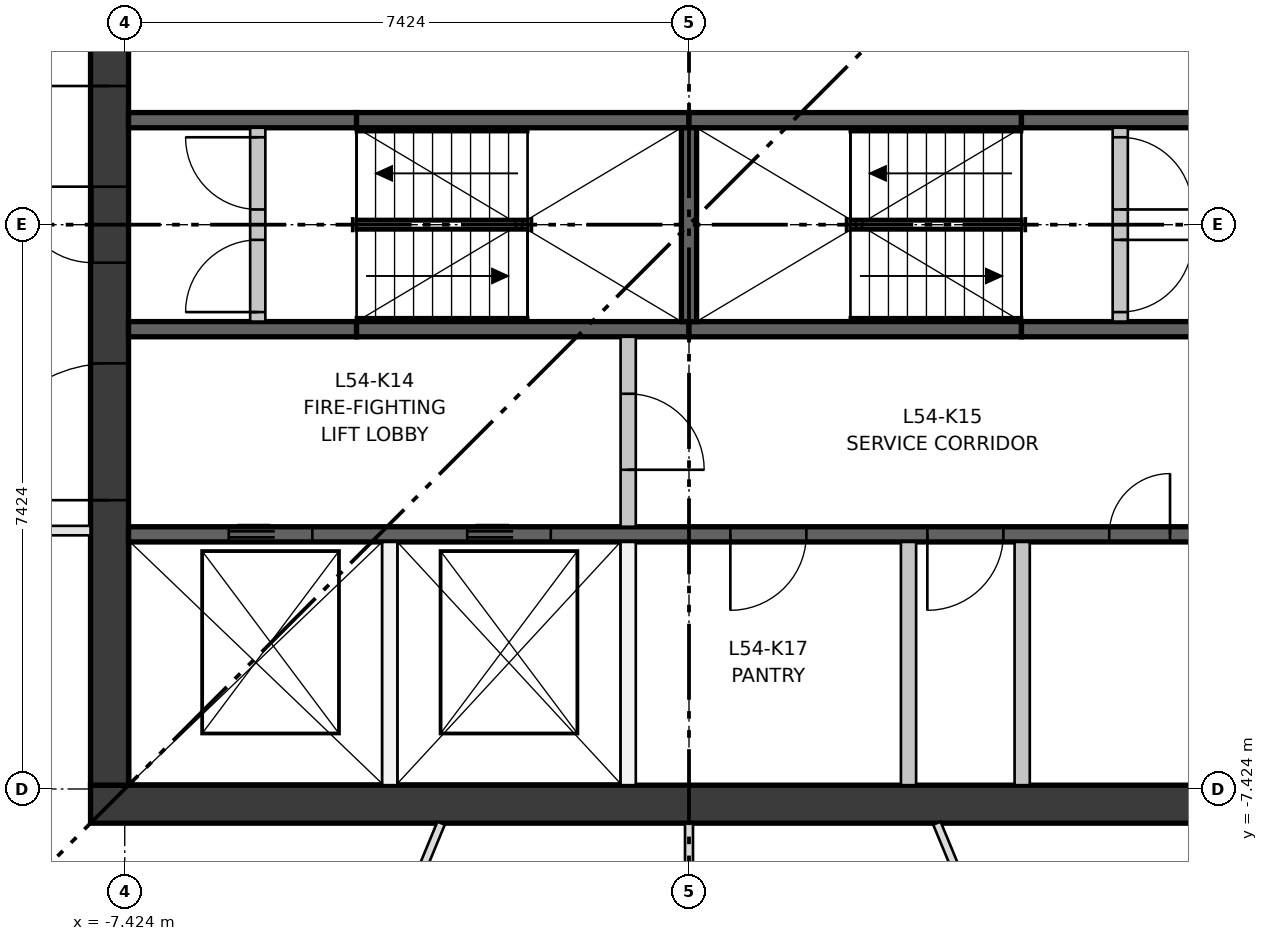
"""IFC4 building model, lengths in metres.
Left out: names, types, materials, properties, quantities, classifications, styles, units other than length and angle.
Written with IfcOpenShell. Run it as: python <this file> out.ifc"""

import sys

from ifc_helpers import new_model, si_unit, direction, frame, frame_2d, origin, place, context, subcontext, project, spatial, rectangle, extrude, element, fill, save


model = new_model("IFC4")
c1 = context("Model", 3, precision=1e-05, world=origin(), true_north=direction((0.0, 1.0)))
c2 = subcontext(c1, "Body", "Model", "MODEL_VIEW")
j1 = project(units=[si_unit("LENGTHUNIT", "METRE"), si_unit("PLANEANGLEUNIT", "RADIAN")], contexts=[c1])
p1 = place(None, origin())
s1 = spatial("IfcSite", under=j1, at=p1, CompositionType="ELEMENT")
p2 = place(p1, origin())
s2 = spatial("IfcBuilding", under=s1, at=p2, CompositionType="ELEMENT")
p3 = place(p2, frame((0.0, 0.0, 201.05)))
s3 = spatial("IfcBuildingStorey", under=s2, at=p3, CompositionType="ELEMENT", Elevation=201.05)
p4 = place(p3, frame((-7.874, -7.624, 0.0), z_axis=(0.0, 0.0, 1.0), x_axis=(1.0, 0.0, 0.0)))
e1 = element("IfcWall", 1, at=p4, inside=s3, PredefinedType="SHEAR", context=c2, shape_type="SweptSolid", body=[
    extrude(rectangle(XDim=15.748, YDim=0.5, at=frame_2d((7.874, 0.0))), origin(), (0.0, 0.0, 1.0), 3.35),
])
p5 = place(p3, frame((-7.624, -7.374, 0.0), z_axis=(0.0, 0.0, 1.0), x_axis=(0.0, 1.0, 0.0)))
e2 = element("IfcWall", 2, at=p5, inside=s3, PredefinedType="SHEAR", context=c2, shape_type="SweptSolid", body=[
    extrude(rectangle(XDim=14.748, YDim=0.5, at=frame_2d((7.374, 0.0))), origin(), (0.0, 0.0, 1.0), 3.35),
])
p6 = place(p5, frame((6.874, 0.0, 0.0)))
e3 = element("IfcOpeningElement", 3, at=p6, cuts=e2, PredefinedType="OPENING", context=c2, shape_type="SweptSolid", body=[
    extrude(rectangle(XDim=1.0, YDim=2.1, at=frame_2d((0.5, 1.05))), frame((0.0, 0.26, 0.0), z_axis=(0.0, -1.0, 0.0), x_axis=(1.0, 0.0, 0.0)), (0.0, 0.0, 1.0), 0.52),
])
p7 = place(p5, frame((3.75, 0.0, 0.0)))
e4 = element("IfcOpeningElement", 4, at=p7, cuts=e2, PredefinedType="OPENING", context=c2, shape_type="SweptSolid", body=[
    extrude(rectangle(XDim=1.8, YDim=2.1, at=frame_2d((0.9, 1.05))), frame((0.0, 0.26, 0.0), z_axis=(0.0, -1.0, 0.0), x_axis=(1.0, 0.0, 0.0)), (0.0, 0.0, 1.0), 0.52),
])
p8 = place(p5, frame((9.198, 0.0, 0.0)))
e5 = element("IfcOpeningElement", 5, at=p8, cuts=e2, PredefinedType="OPENING", context=c2, shape_type="SweptSolid", body=[
    extrude(rectangle(XDim=1.8, YDim=2.1, at=frame_2d((0.9, 1.05))), frame((0.0, 0.26, 0.0), z_axis=(0.0, -1.0, 0.0), x_axis=(1.0, 0.0, 0.0)), (0.0, 0.0, 1.0), 0.52),
])
p9 = place(p3, frame((-7.374, -4.074, 0.0), z_axis=(0.0, 0.0, 1.0), x_axis=(1.0, 0.0, 0.0)))
e6 = element("IfcWall", 6, at=p9, inside=s3, PredefinedType="SHEAR", context=c2, shape_type="SweptSolid", body=[
    extrude(rectangle(XDim=14.748, YDim=0.2, at=frame_2d((7.374, 0.0))), origin(), (0.0, 0.0, 1.0), 3.0),
])
p10 = place(p9, frame((1.319, 0.0, 0.0)))
e7 = element("IfcOpeningElement", 7, at=p10, cuts=e6, PredefinedType="OPENING", context=c2, shape_type="SweptSolid", body=[
    extrude(rectangle(XDim=1.1, YDim=2.1, at=frame_2d((0.55, 1.05))), frame((0.0, 0.11, 0.0), z_axis=(0.0, -1.0, 0.0), x_axis=(1.0, 0.0, 0.0)), (0.0, 0.0, 1.0), 0.22),
])
p11 = place(p9, frame((4.456, 0.0, 0.0)))
e8 = element("IfcOpeningElement", 8, at=p11, cuts=e6, PredefinedType="OPENING", context=c2, shape_type="SweptSolid", body=[
    extrude(rectangle(XDim=1.1, YDim=2.1, at=frame_2d((0.55, 1.05))), frame((0.0, 0.11, 0.0), z_axis=(0.0, -1.0, 0.0), x_axis=(1.0, 0.0, 0.0)), (0.0, 0.0, 1.0), 0.22),
])
p12 = place(p9, frame((7.918, 0.0, 0.0)))
e9 = element("IfcOpeningElement", 9, at=p12, cuts=e6, PredefinedType="OPENING", context=c2, shape_type="SweptSolid", body=[
    extrude(rectangle(XDim=1.0, YDim=2.1, at=frame_2d((0.5, 1.05))), frame((0.0, 0.11, 0.0), z_axis=(0.0, -1.0, 0.0), x_axis=(1.0, 0.0, 0.0)), (0.0, 0.0, 1.0), 0.22),
])
p13 = place(p9, frame((10.51, 0.0, 0.0)))
e10 = element("IfcOpeningElement", 10, at=p13, cuts=e6, PredefinedType="OPENING", context=c2, shape_type="SweptSolid", body=[
    extrude(rectangle(XDim=1.0, YDim=2.1, at=frame_2d((0.5, 1.05))), frame((0.0, 0.11, 0.0), z_axis=(0.0, -1.0, 0.0), x_axis=(1.0, 0.0, 0.0)), (0.0, 0.0, 1.0), 0.22),
])
p14 = place(p9, frame((12.903, 0.0, 0.0)))
e11 = element("IfcOpeningElement", 11, at=p14, cuts=e6, PredefinedType="OPENING", context=c2, shape_type="SweptSolid", body=[
    extrude(rectangle(XDim=0.8, YDim=2.1, at=frame_2d((0.4, 1.05))), frame((0.0, 0.11, 0.0), z_axis=(0.0, -1.0, 0.0), x_axis=(1.0, 0.0, 0.0)), (0.0, 0.0, 1.0), 0.22),
])
p15 = place(p3, frame((-7.374, -1.375, 0.0), z_axis=(0.0, 0.0, 1.0), x_axis=(1.0, 0.0, 0.0)))
e12 = element("IfcWall", 12, at=p15, inside=s3, PredefinedType="SHEAR", context=c2, shape_type="SweptSolid", body=[
    extrude(rectangle(XDim=3.0, YDim=0.2, at=frame_2d((1.5, 0.0))), origin(), (0.0, 0.0, 1.0), 3.0),
])
for number, where, z_axis, x_axis in (
    (13, (-4.374, -1.375, 0.0), (0.0, 0.0, 1.0), (1.0, 0.0, 0.0)),
    (14, (0.0, -1.375, 0.0), (0.0, 0.0, 1.0), (1.0, 0.0, 0.0)),
):
    element("IfcWall", number, at=place(p3, frame(where, z_axis=z_axis, x_axis=x_axis)), inside=s3, PredefinedType="SHEAR", context=c2, shape_type="SweptSolid", body=[
        extrude(rectangle(XDim=4.374, YDim=0.2, at=frame_2d((2.187, 0.0))), origin(), (0.0, 0.0, 1.0), 3.0),
    ])
for number, where, z_axis, x_axis in (
    (15, (4.374, -1.375, 0.0), (0.0, 0.0, 1.0), (1.0, 0.0, 0.0)),
    (16, (-7.374, 1.375, 0.0), (0.0, 0.0, 1.0), (1.0, 0.0, 0.0)),
):
    element("IfcWall", number, at=place(p3, frame(where, z_axis=z_axis, x_axis=x_axis)), inside=s3, PredefinedType="SHEAR", context=c2, shape_type="SweptSolid", body=[
        extrude(rectangle(XDim=3.0, YDim=0.2, at=frame_2d((1.5, 0.0))), origin(), (0.0, 0.0, 1.0), 3.0),
    ])
for number, where, z_axis, x_axis in (
    (17, (-4.374, 1.375, 0.0), (0.0, 0.0, 1.0), (1.0, 0.0, 0.0)),
    (18, (0.0, 1.375, 0.0), (0.0, 0.0, 1.0), (1.0, 0.0, 0.0)),
):
    element("IfcWall", number, at=place(p3, frame(where, z_axis=z_axis, x_axis=x_axis)), inside=s3, PredefinedType="SHEAR", context=c2, shape_type="SweptSolid", body=[
        extrude(rectangle(XDim=4.374, YDim=0.2, at=frame_2d((2.187, 0.0))), origin(), (0.0, 0.0, 1.0), 3.0),
    ])
p16 = place(p3, frame((4.374, 1.375, 0.0), z_axis=(0.0, 0.0, 1.0), x_axis=(1.0, 0.0, 0.0)))
e19 = element("IfcWall", 19, at=p16, inside=s3, PredefinedType="SHEAR", context=c2, shape_type="SweptSolid", body=[
    extrude(rectangle(XDim=3.0, YDim=0.2, at=frame_2d((1.5, 0.0))), origin(), (0.0, 0.0, 1.0), 3.0),
])
p17 = place(p3, frame((0.0, -1.275, 0.0), z_axis=(0.0, 0.0, 1.0), x_axis=(0.0, 1.0, 0.0)))
e20 = element("IfcWall", 20, at=p17, inside=s3, PredefinedType="SHEAR", context=c2, shape_type="SweptSolid", body=[
    extrude(rectangle(XDim=2.55, YDim=0.2, at=frame_2d((1.275, 0.0))), origin(), (0.0, 0.0, 1.0), 3.0),
])
for number, where, z_axis, x_axis in (
    (21, (-3.937, -7.374, 0.0), (0.0, 0.0, 1.0), (0.0, 1.0, 0.0)),
    (22, (-0.8, -7.374, 0.0), (0.0, 0.0, 1.0), (0.0, 1.0, 0.0)),
):
    element("IfcWall", number, at=place(p3, frame(where, z_axis=z_axis, x_axis=x_axis)), inside=s3, PredefinedType="PARTITIONING", context=c2, shape_type="SweptSolid", body=[
        extrude(rectangle(XDim=3.2, YDim=0.2, at=frame_2d((1.6, 0.0))), origin(), (0.0, 0.0, 1.0), 3.0),
    ])
p18 = place(p3, frame((-0.8, -3.974, 0.0), z_axis=(0.0, 0.0, 1.0), x_axis=(0.0, 1.0, 0.0)))
e23 = element("IfcWall", 23, at=p18, inside=s3, PredefinedType="PARTITIONING", context=c2, shape_type="SweptSolid", body=[
    extrude(rectangle(XDim=2.499, YDim=0.2, at=frame_2d((1.25, 0.0))), origin(), (0.0, 0.0, 1.0), 3.0),
])
p19 = place(p18, frame((0.75, 0.0, 0.0)))
e24 = element("IfcOpeningElement", 24, at=p19, cuts=e23, PredefinedType="OPENING", context=c2, shape_type="SweptSolid", body=[
    extrude(rectangle(XDim=1.0, YDim=2.1, at=frame_2d((0.5, 1.05))), frame((0.0, 0.11, 0.0), z_axis=(0.0, -1.0, 0.0), x_axis=(1.0, 0.0, 0.0)), (0.0, 0.0, 1.0), 0.22),
])
for number, where, z_axis, x_axis in (
    (25, (2.888, -7.374, 0.0), (0.0, 0.0, 1.0), (0.0, 1.0, 0.0)),
    (26, (4.384, -7.374, 0.0), (0.0, 0.0, 1.0), (0.0, 1.0, 0.0)),
):
    element("IfcWall", number, at=place(p3, frame(where, z_axis=z_axis, x_axis=x_axis)), inside=s3, PredefinedType="PARTITIONING", context=c2, shape_type="SweptSolid", body=[
        extrude(rectangle(XDim=3.2, YDim=0.2, at=frame_2d((1.6, 0.0))), origin(), (0.0, 0.0, 1.0), 3.0),
    ])
p20 = place(p3, frame((-5.674, -1.275, 0.0), z_axis=(0.0, 0.0, 1.0), x_axis=(0.0, 1.0, 0.0)))
e27 = element("IfcWall", 27, at=p20, inside=s3, PredefinedType="PARTITIONING", context=c2, shape_type="SweptSolid", body=[
    extrude(rectangle(XDim=2.55, YDim=0.2, at=frame_2d((1.275, 0.0))), origin(), (0.0, 0.0, 1.0), 3.0),
])
p21 = place(p20, frame((0.125, 0.0, 0.0)))
e28 = element("IfcOpeningElement", 28, at=p21, cuts=e27, PredefinedType="OPENING", context=c2, shape_type="SweptSolid", body=[
    extrude(rectangle(XDim=0.95, YDim=2.1, at=frame_2d((0.475, 1.05))), frame((0.0, 0.11, 0.0), z_axis=(0.0, -1.0, 0.0), x_axis=(1.0, 0.0, 0.0)), (0.0, 0.0, 1.0), 0.22),
])
p22 = place(p20, frame((1.475, 0.0, 0.0)))
e29 = element("IfcOpeningElement", 29, at=p22, cuts=e27, PredefinedType="OPENING", context=c2, shape_type="SweptSolid", body=[
    extrude(rectangle(XDim=0.95, YDim=2.1, at=frame_2d((0.475, 1.05))), frame((0.0, 0.11, 0.0), z_axis=(0.0, -1.0, 0.0), x_axis=(1.0, 0.0, 0.0)), (0.0, 0.0, 1.0), 0.22),
])
p23 = place(p3, frame((5.674, -1.275, 0.0), z_axis=(0.0, 0.0, 1.0), x_axis=(0.0, 1.0, 0.0)))
e30 = element("IfcWall", 30, at=p23, inside=s3, PredefinedType="PARTITIONING", context=c2, shape_type="SweptSolid", body=[
    extrude(rectangle(XDim=2.55, YDim=0.2, at=frame_2d((1.275, 0.0))), origin(), (0.0, 0.0, 1.0), 3.0),
])
p24 = place(p23, frame((0.125, 0.0, 0.0)))
e31 = element("IfcOpeningElement", 31, at=p24, cuts=e30, PredefinedType="OPENING", context=c2, shape_type="SweptSolid", body=[
    extrude(rectangle(XDim=0.95, YDim=2.1, at=frame_2d((0.475, 1.05))), frame((0.0, 0.11, 0.0), z_axis=(0.0, -1.0, 0.0), x_axis=(1.0, 0.0, 0.0)), (0.0, 0.0, 1.0), 0.22),
])
p25 = place(p23, frame((1.475, 0.0, 0.0)))
e32 = element("IfcOpeningElement", 32, at=p25, cuts=e30, PredefinedType="OPENING", context=c2, shape_type="SweptSolid", body=[
    extrude(rectangle(XDim=0.95, YDim=2.1, at=frame_2d((0.475, 1.05))), frame((0.0, 0.11, 0.0), z_axis=(0.0, -1.0, 0.0), x_axis=(1.0, 0.0, 0.0)), (0.0, 0.0, 1.0), 0.22),
])
p26 = place(p3, frame((-7.874, -4.024, 0.0), z_axis=(0.0, 0.0, 1.0), x_axis=(-1.0, 0.0, 0.0)))
e33 = element("IfcWall", 33, at=p26, inside=s3, PredefinedType="PARTITIONING", context=c2, shape_type="SweptSolid", body=[
    extrude(rectangle(XDim=4.951, YDim=0.125, at=frame_2d((2.476, 0.0))), origin(), (0.0, 0.0, 1.0), 3.0),
])
p27 = place(p26, frame((1.6, 0.0, 0.0)))
e34 = element("IfcOpeningElement", 34, at=p27, cuts=e33, PredefinedType="OPENING", context=c2, shape_type="SweptSolid", body=[
    extrude(rectangle(XDim=1.8, YDim=2.1, at=frame_2d((0.9, 1.05))), frame((0.0, 0.073, 0.0), z_axis=(0.0, -1.0, 0.0), x_axis=(1.0, 0.0, 0.0)), (0.0, 0.0, 1.0), 0.145),
])
p28 = place(p3, frame((-3.261, -7.874, 0.0), z_axis=(0.0, 0.0, 1.0), x_axis=(-0.38271544888, -0.923866270186, 0.0)))
e35 = element("IfcWall", 35, at=p28, inside=s3, PredefinedType="PARTITIONING", context=c2, shape_type="SweptSolid", body=[
    extrude(rectangle(XDim=4.427, YDim=0.105, at=frame_2d((2.214, 0.0))), origin(), (0.0, 0.0, 1.0), 3.0),
])
p29 = place(p28, frame((1.7, 0.0, 0.0)))
e36 = element("IfcOpeningElement", 36, at=p29, cuts=e35, PredefinedType="OPENING", context=c2, shape_type="SweptSolid", body=[
    extrude(rectangle(XDim=1.0, YDim=2.1, at=frame_2d((0.5, 1.05))), frame((0.0, 0.062, 0.0), z_axis=(0.0, -1.0, 0.0), x_axis=(1.0, 0.0, 0.0)), (0.0, 0.0, 1.0), 0.125),
])
p30 = place(p3, frame((0.0, -7.874, 0.0), z_axis=(0.0, 0.0, 1.0), x_axis=(0.0, -1.0, 0.0)))
e37 = element("IfcWall", 37, at=p30, inside=s3, PredefinedType="PARTITIONING", context=c2, shape_type="SweptSolid", body=[
    extrude(rectangle(XDim=5.076, YDim=0.105, at=frame_2d((2.538, 0.0))), origin(), (0.0, 0.0, 1.0), 3.0),
])
p31 = place(p3, frame((4.956, -11.964, 0.0), z_axis=(0.0, 0.0, 1.0), x_axis=(-0.38271544888, 0.923866270186, 0.0)))
e38 = element("IfcWall", 38, at=p31, inside=s3, PredefinedType="PARTITIONING", context=c2, shape_type="SweptSolid", body=[
    extrude(rectangle(XDim=4.427, YDim=0.105, at=frame_2d((2.214, 0.0))), origin(), (0.0, 0.0, 1.0), 3.0),
])
p32 = place(p31, frame((1.7, 0.0, 0.0)))
e39 = element("IfcOpeningElement", 39, at=p32, cuts=e38, PredefinedType="OPENING", context=c2, shape_type="SweptSolid", body=[
    extrude(rectangle(XDim=1.0, YDim=2.1, at=frame_2d((0.5, 1.05))), frame((0.0, 0.062, 0.0), z_axis=(0.0, -1.0, 0.0), x_axis=(1.0, 0.0, 0.0)), (0.0, 0.0, 1.0), 0.125),
])
p33 = place(p10, origin())
e40 = element("IfcDoor", 40, at=p33, inside=s3, OperationType="DOUBLE_DOOR_SLIDING", PredefinedType="DOOR", context=c2, shape_type="SweptSolid", body=[
    extrude(rectangle(XDim=1.1, YDim=2.1, at=frame_2d((0.55, 1.05))), frame((0.0, 0.025, 0.0), z_axis=(0.0, -1.0, 0.0), x_axis=(1.0, 0.0, 0.0)), (0.0, 0.0, 1.0), 0.05),
])
fill(e7, e40)
p34 = place(p11, origin())
e41 = element("IfcDoor", 41, at=p34, inside=s3, OperationType="DOUBLE_DOOR_SLIDING", PredefinedType="DOOR", context=c2, shape_type="SweptSolid", body=[
    extrude(rectangle(XDim=1.1, YDim=2.1, at=frame_2d((0.55, 1.05))), frame((0.0, 0.025, 0.0), z_axis=(0.0, -1.0, 0.0), x_axis=(1.0, 0.0, 0.0)), (0.0, 0.0, 1.0), 0.05),
])
fill(e8, e41)
p35 = place(p21, origin())
e42 = element("IfcDoor", 42, at=p35, inside=s3, OperationType="SINGLE_SWING_LEFT", PredefinedType="DOOR", context=c2, shape_type="SweptSolid", body=[
    extrude(rectangle(XDim=0.95, YDim=2.1, at=frame_2d((0.475, 1.05))), frame((0.0, 0.025, 0.0), z_axis=(0.0, -1.0, 0.0), x_axis=(1.0, 0.0, 0.0)), (0.0, 0.0, 1.0), 0.05),
])
fill(e28, e42)
p36 = place(p22, origin())
e43 = element("IfcDoor", 43, at=p36, inside=s3, OperationType="SINGLE_SWING_RIGHT", PredefinedType="DOOR", context=c2, shape_type="SweptSolid", body=[
    extrude(rectangle(XDim=0.95, YDim=2.1, at=frame_2d((0.475, 1.05))), frame((0.0, 0.025, 0.0), z_axis=(0.0, -1.0, 0.0), x_axis=(1.0, 0.0, 0.0)), (0.0, 0.0, 1.0), 0.05),
])
fill(e29, e43)
p37 = place(p24, frame((0.95, 0.0, 0.0), z_axis=(0.0, 0.0, 1.0), x_axis=(-1.0, 0.0, 0.0)))
e44 = element("IfcDoor", 44, at=p37, inside=s3, OperationType="SINGLE_SWING_RIGHT", PredefinedType="DOOR", context=c2, shape_type="SweptSolid", body=[
    extrude(rectangle(XDim=0.95, YDim=2.1, at=frame_2d((0.475, 1.05))), frame((0.0, 0.025, 0.0), z_axis=(0.0, -1.0, 0.0), x_axis=(1.0, 0.0, 0.0)), (0.0, 0.0, 1.0), 0.05),
])
fill(e31, e44)
p38 = place(p25, frame((0.95, 0.0, 0.0), z_axis=(0.0, 0.0, 1.0), x_axis=(-1.0, 0.0, 0.0)))
e45 = element("IfcDoor", 45, at=p38, inside=s3, OperationType="SINGLE_SWING_LEFT", PredefinedType="DOOR", context=c2, shape_type="SweptSolid", body=[
    extrude(rectangle(XDim=0.95, YDim=2.1, at=frame_2d((0.475, 1.05))), frame((0.0, 0.025, 0.0), z_axis=(0.0, -1.0, 0.0), x_axis=(1.0, 0.0, 0.0)), (0.0, 0.0, 1.0), 0.05),
])
fill(e32, e45)
p39 = place(p19, frame((1.0, 0.0, 0.0), z_axis=(0.0, 0.0, 1.0), x_axis=(-1.0, 0.0, 0.0)))
e46 = element("IfcDoor", 46, at=p39, inside=s3, OperationType="SINGLE_SWING_LEFT", PredefinedType="DOOR", context=c2, shape_type="SweptSolid", body=[
    extrude(rectangle(XDim=1.0, YDim=2.1, at=frame_2d((0.5, 1.05))), frame((0.0, 0.025, 0.0), z_axis=(0.0, -1.0, 0.0), x_axis=(1.0, 0.0, 0.0)), (0.0, 0.0, 1.0), 0.05),
])
fill(e24, e46)
p40 = place(p12, frame((1.0, 0.0, 0.0), z_axis=(0.0, 0.0, 1.0), x_axis=(-1.0, 0.0, 0.0)))
e47 = element("IfcDoor", 47, at=p40, inside=s3, OperationType="SINGLE_SWING_LEFT", PredefinedType="DOOR", context=c2, shape_type="SweptSolid", body=[
    extrude(rectangle(XDim=1.0, YDim=2.1, at=frame_2d((0.5, 1.05))), frame((0.0, 0.025, 0.0), z_axis=(0.0, -1.0, 0.0), x_axis=(1.0, 0.0, 0.0)), (0.0, 0.0, 1.0), 0.05),
])
fill(e9, e47)
p41 = place(p13, frame((1.0, 0.0, 0.0), z_axis=(0.0, 0.0, 1.0), x_axis=(-1.0, 0.0, 0.0)))
e48 = element("IfcDoor", 48, at=p41, inside=s3, OperationType="SINGLE_SWING_LEFT", PredefinedType="DOOR", context=c2, shape_type="SweptSolid", body=[
    extrude(rectangle(XDim=1.0, YDim=2.1, at=frame_2d((0.5, 1.05))), frame((0.0, 0.025, 0.0), z_axis=(0.0, -1.0, 0.0), x_axis=(1.0, 0.0, 0.0)), (0.0, 0.0, 1.0), 0.05),
])
fill(e10, e48)
p42 = place(p14, origin())
e49 = element("IfcDoor", 49, at=p42, inside=s3, OperationType="SINGLE_SWING_RIGHT", PredefinedType="DOOR", context=c2, shape_type="SweptSolid", body=[
    extrude(rectangle(XDim=0.8, YDim=2.1, at=frame_2d((0.4, 1.05))), frame((0.0, 0.025, 0.0), z_axis=(0.0, -1.0, 0.0), x_axis=(1.0, 0.0, 0.0)), (0.0, 0.0, 1.0), 0.05),
])
fill(e11, e49)
p43 = place(p6, origin())
e50 = element("IfcDoor", 50, at=p43, inside=s3, OperationType="SINGLE_SWING_RIGHT", PredefinedType="DOOR", context=c2, shape_type="SweptSolid", body=[
    extrude(rectangle(XDim=1.0, YDim=2.1, at=frame_2d((0.5, 1.05))), frame((0.0, 0.25, 0.0), z_axis=(0.0, -1.0, 0.0), x_axis=(1.0, 0.0, 0.0)), (0.0, 0.0, 1.0), 0.05),
])
fill(e3, e50)
p44 = place(p7, origin())
e51 = element("IfcDoor", 51, at=p44, inside=s3, OperationType="DOUBLE_DOOR_SINGLE_SWING", PredefinedType="DOOR", context=c2, shape_type="SweptSolid", body=[
    extrude(rectangle(XDim=1.8, YDim=2.1, at=frame_2d((0.9, 1.05))), frame((0.0, 0.025, 0.0), z_axis=(0.0, -1.0, 0.0), x_axis=(1.0, 0.0, 0.0)), (0.0, 0.0, 1.0), 0.05),
])
fill(e4, e51)
p45 = place(p8, origin())
e52 = element("IfcDoor", 52, at=p45, inside=s3, OperationType="DOUBLE_DOOR_SINGLE_SWING", PredefinedType="DOOR", context=c2, shape_type="SweptSolid", body=[
    extrude(rectangle(XDim=1.8, YDim=2.1, at=frame_2d((0.9, 1.05))), frame((0.0, 0.025, 0.0), z_axis=(0.0, -1.0, 0.0), x_axis=(1.0, 0.0, 0.0)), (0.0, 0.0, 1.0), 0.05),
])
fill(e5, e52)
save(model, sys.argv[1])
